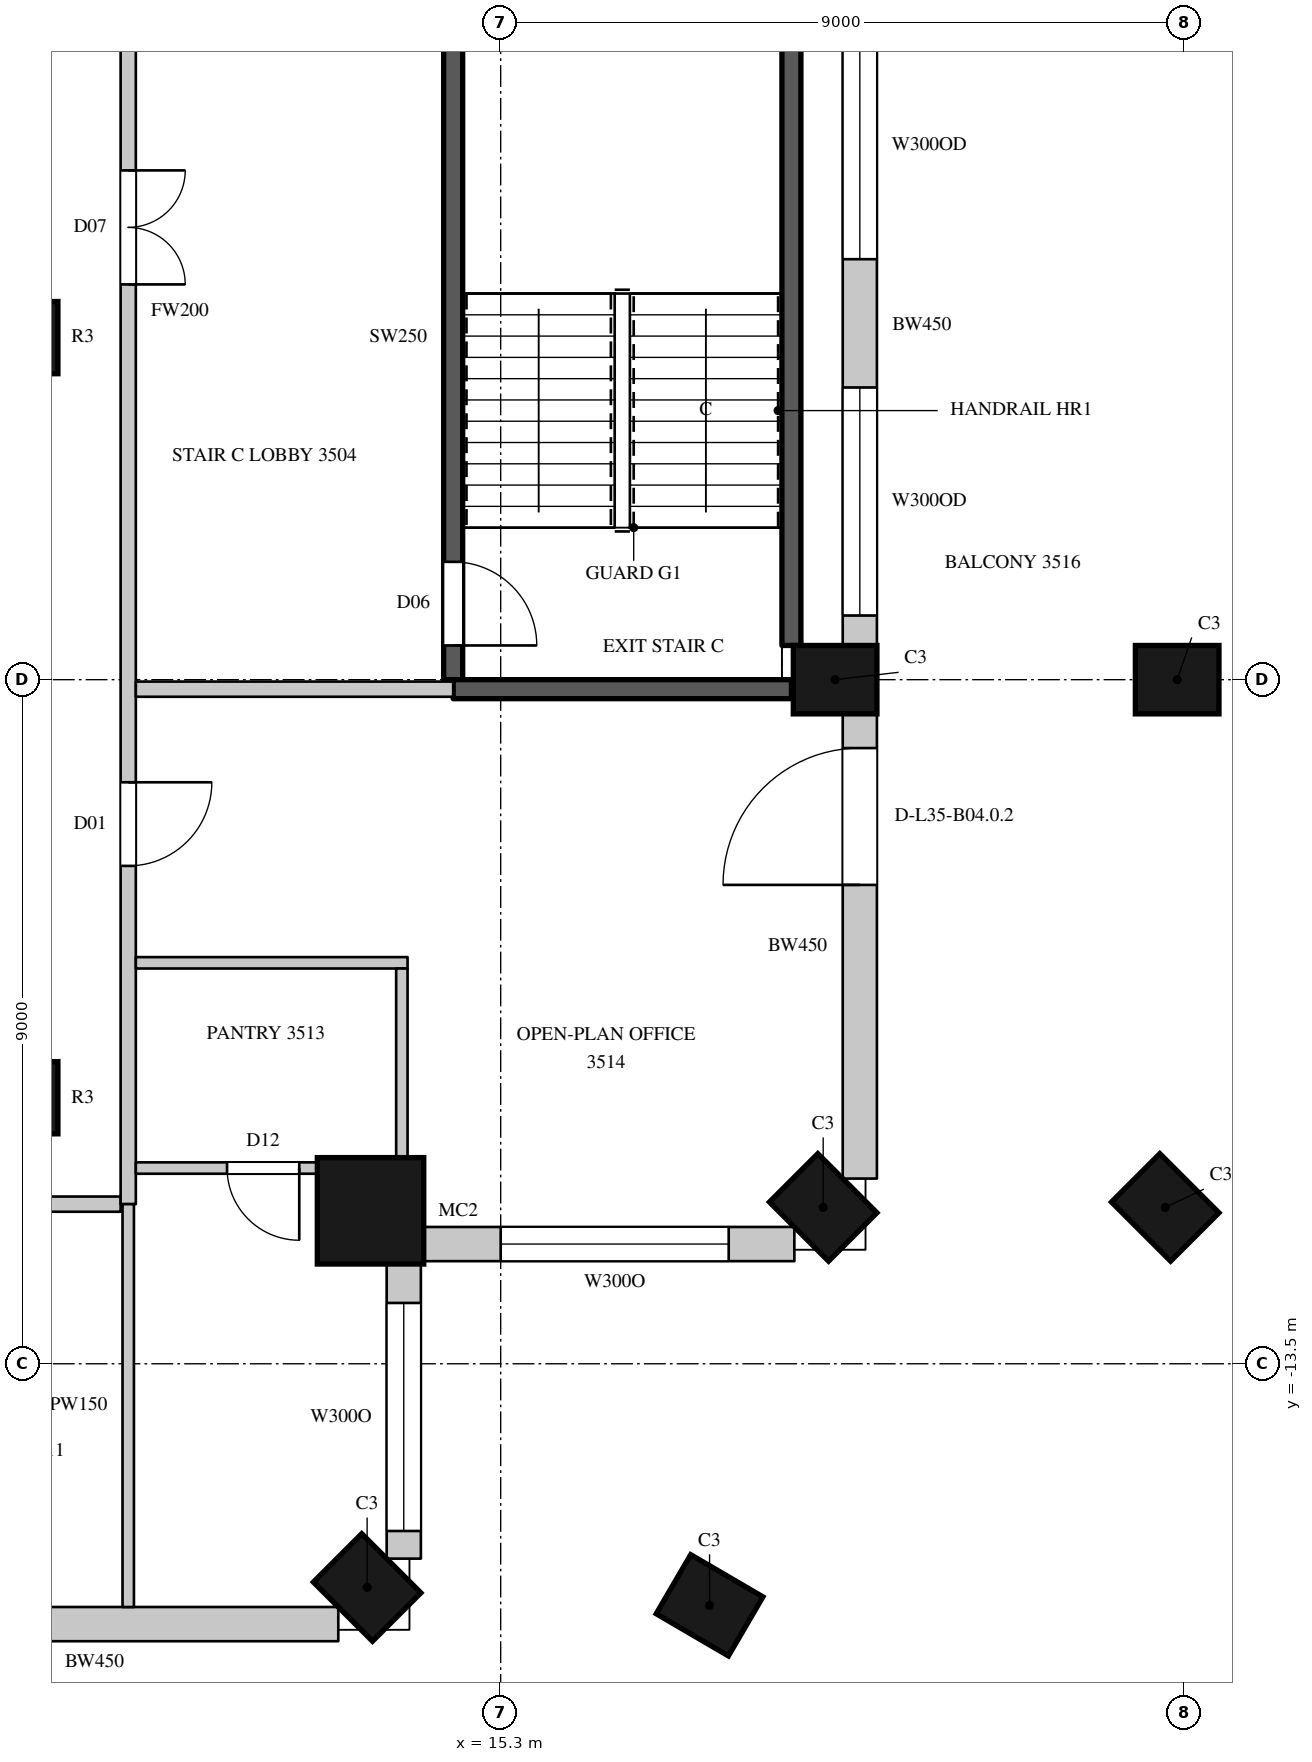
"""IFC4 building model, lengths in metres.
Left out: names, types, materials, properties, quantities, classifications, styles, units other than length and angle.
Written with IfcOpenShell. Run it as: python <this file> out.ifc"""

import sys

from ifc_helpers import new_model, si_unit, direction, frame, frame_2d, origin, origin_2d, place, context, subcontext, project, spatial, rectangle, circle, extrude, element, fill, save


model = new_model("IFC4")
c1 = context("Model", 3, precision=1e-05, world=origin(), true_north=direction((0.0, 1.0)))
c2 = subcontext(c1, "Body", "Model", "MODEL_VIEW")
j1 = project(units=[si_unit("LENGTHUNIT", "METRE"), si_unit("PLANEANGLEUNIT", "RADIAN")], contexts=[c1])
p1 = place(None, origin())
s1 = spatial("IfcSite", under=j1, at=p1, CompositionType="ELEMENT")
p2 = place(p1, origin())
s2 = spatial("IfcBuilding", under=s1, at=p2, CompositionType="ELEMENT")
p3 = place(p2, frame((0.0, 0.0, 164.6)))
s3 = spatial("IfcBuildingStorey", under=s2, at=p3, CompositionType="ELEMENT", Elevation=164.6)
p4 = place(p3, frame((13.543, -16.443, 0.0), z_axis=(0.0, 0.0, 1.0), x_axis=(0.707106781187, 0.707106781187, 0.0)))
e1 = element("IfcColumn", 1, at=p4, inside=s3, PredefinedType="COLUMN", context=c2, shape_type="SweptSolid", body=[
    extrude(rectangle(XDim=0.9, YDim=1.1, at=origin_2d()), origin(), (0.0, 0.0, 1.0), 4.1),
])
p5 = place(p3, frame((13.588, -11.488, 0.0), z_axis=(0.0, 0.0, 1.0), x_axis=(1.0, 0.0, 0.0)))
e2 = element("IfcColumn", 2, at=p5, inside=s3, PredefinedType="COLUMN", context=c2, shape_type="SweptSolid", body=[
    extrude(circle(Radius=0.7, at=origin_2d()), origin(), (0.0, 0.0, 1.0), 4.1),
])
for number, where, z_axis, x_axis in (
    (3, (19.543, -11.443, 0.0), (0.0, 0.0, 1.0), (0.707, 0.707, 0.0)),
    (4, (19.7, -4.5, 0.0), (0.0, 0.0, 1.0), (0.0, 1.0, 0.0)),
    (5, (18.048, -16.677, 0.0), (0.0, 0.0, 1.0), (0.504, 0.863, 0.0)),
    (6, (24.043, -11.443, 0.0), (0.0, 0.0, 1.0), (0.707, 0.707, 0.0)),
    (7, (24.2, -4.5, 0.0), (0.0, 0.0, 1.0), (0.0, 1.0, 0.0)),
):
    element("IfcColumn", number, at=place(p3, frame(where, z_axis=z_axis, x_axis=x_axis)), inside=s3, PredefinedType="COLUMN", context=c2, shape_type="SweptSolid", body=[
        extrude(rectangle(XDim=0.9, YDim=1.1, at=origin_2d()), origin(), (0.0, 0.0, 1.0), 4.1),
    ])
for number, where, z_axis, x_axis in (
    (8, (9.0, -10.0, 0.0), (0.0, 0.0, 1.0), (1.0, 0.0, 0.0)),
    (9, (9.0, 0.0, 0.0), (0.0, 0.0, 1.0), (1.0, 0.0, 0.0)),
):
    element("IfcColumn", number, at=place(p3, frame(where, z_axis=z_axis, x_axis=x_axis)), inside=s3, PredefinedType="COLUMN", context=c2, shape_type="SweptSolid", body=[
        extrude(circle(Radius=0.475, at=origin_2d()), origin(), (0.0, 0.0, 1.0), 4.1),
    ])
p6 = place(p3, frame((6.75, -16.925, 0.0), z_axis=(0.0, 0.0, 1.0), x_axis=(1.0, 0.0, 0.0)))
e10 = element("IfcWall", 10, at=p6, inside=s3, PredefinedType="SOLIDWALL", context=c2, shape_type="SweptSolid", body=[
    extrude(rectangle(XDim=6.414, YDim=0.45, at=frame_2d((3.207, 0.0))), origin(), (0.0, 0.0, 1.0), 3.8),
])
p7 = place(p6, frame((0.525, 0.0, 0.0)))
e11 = element("IfcOpeningElement", 11, at=p7, cuts=e10, PredefinedType="OPENING", context=c2, shape_type="SweptSolid", body=[
    extrude(rectangle(XDim=1.8, YDim=2.4, at=frame_2d((0.9, 1.2))), frame((0.0, 0.235, 0.0), z_axis=(0.0, -1.0, 0.0), x_axis=(1.0, 0.0, 0.0)), (0.0, 0.0, 1.0), 0.47),
])
p8 = place(p3, frame((14.025, -16.064, 0.0), z_axis=(0.0, 0.0, 1.0), x_axis=(0.0, 1.0, 0.0)))
e12 = element("IfcWall", 12, at=p8, inside=s3, PredefinedType="SOLIDWALL", context=c2, shape_type="SweptSolid", body=[
    extrude(rectangle(XDim=3.909, YDim=0.45, at=frame_2d((1.955, 0.0))), origin(), (0.0, 0.0, 1.0), 3.8),
])
p9 = place(p8, frame((0.364, 0.0, 1.05)))
e13 = element("IfcOpeningElement", 13, at=p9, cuts=e12, PredefinedType="OPENING", context=c2, shape_type="SweptSolid", body=[
    extrude(rectangle(XDim=3.0, YDim=2.4, at=frame_2d((1.5, 1.2))), frame((0.0, 0.235, 0.0), z_axis=(0.0, -1.0, 0.0), x_axis=(1.0, 0.0, 0.0)), (0.0, 0.0, 1.0), 0.47),
])
p10 = place(p3, frame((14.255, -11.925, 0.0), z_axis=(0.0, 0.0, 1.0), x_axis=(1.0, 0.0, 0.0)))
e14 = element("IfcWall", 14, at=p10, inside=s3, PredefinedType="SOLIDWALL", context=c2, shape_type="SweptSolid", body=[
    extrude(rectangle(XDim=4.909, YDim=0.45, at=frame_2d((2.455, 0.0))), origin(), (0.0, 0.0, 1.0), 3.8),
])
p11 = place(p10, frame((1.045, 0.0, 1.05)))
e15 = element("IfcOpeningElement", 15, at=p11, cuts=e14, PredefinedType="OPENING", context=c2, shape_type="SweptSolid", body=[
    extrude(rectangle(XDim=3.0, YDim=2.4, at=frame_2d((1.5, 1.2))), frame((0.0, 0.235, 0.0), z_axis=(0.0, -1.0, 0.0), x_axis=(1.0, 0.0, 0.0)), (0.0, 0.0, 1.0), 0.47),
])
p12 = place(p3, frame((20.025, -11.064, 0.0), z_axis=(0.0, 0.0, 1.0), x_axis=(0.0, 1.0, 0.0)))
e16 = element("IfcWall", 16, at=p12, inside=s3, PredefinedType="SOLIDWALL", context=c2, shape_type="SweptSolid", body=[
    extrude(rectangle(XDim=6.114, YDim=0.45, at=frame_2d((3.057, 0.0))), origin(), (0.0, 0.0, 1.0), 3.8),
])
p13 = place(p12, frame((3.864, 0.0, 0.0)))
e17 = element("IfcOpeningElement", 17, at=p13, cuts=e16, PredefinedType="OPENING", context=c2, shape_type="SweptSolid", body=[
    extrude(rectangle(XDim=1.8, YDim=2.4, at=frame_2d((0.9, 1.2))), frame((0.0, 0.235, 0.0), z_axis=(0.0, -1.0, 0.0), x_axis=(1.0, 0.0, 0.0)), (0.0, 0.0, 1.0), 0.47),
])
p14 = place(p3, frame((20.025, -4.05, 0.0), z_axis=(0.0, 0.0, 1.0), x_axis=(0.0, 1.0, 0.0)))
e18 = element("IfcWall", 18, at=p14, inside=s3, PredefinedType="SOLIDWALL", context=c2, shape_type="SweptSolid", body=[
    extrude(rectangle(XDim=8.439, YDim=0.45, at=frame_2d((4.219, 0.0))), origin(), (0.0, 0.0, 1.0), 3.8),
])
p15 = place(p14, frame((0.394, 0.0, 1.05)))
e19 = element("IfcOpeningElement", 19, at=p15, cuts=e18, PredefinedType="OPENING", context=c2, shape_type="SweptSolid", body=[
    extrude(rectangle(XDim=3.0, YDim=2.4, at=frame_2d((1.5, 1.2))), frame((0.0, 0.235, 0.0), z_axis=(0.0, -1.0, 0.0), x_axis=(1.0, 0.0, 0.0)), (0.0, 0.0, 1.0), 0.47),
])
p16 = place(p14, frame((5.082, 0.0, 1.05)))
e20 = element("IfcOpeningElement", 20, at=p16, cuts=e18, PredefinedType="OPENING", context=c2, shape_type="SweptSolid", body=[
    extrude(rectangle(XDim=3.0, YDim=2.4, at=frame_2d((1.5, 1.2))), frame((0.0, 0.235, 0.0), z_axis=(0.0, -1.0, 0.0), x_axis=(1.0, 0.0, 0.0)), (0.0, 0.0, 1.0), 0.47),
])
p17 = place(p3, frame((21.1, -5.1, 0.0), z_axis=(0.0, 0.0, 1.0), x_axis=(0.0, 1.0, 0.0)))
e21 = element("IfcWall", 21, at=p17, inside=s3, PredefinedType="SOLIDWALL", context=c2, shape_type="SweptSolid", body=[
    extrude(rectangle(XDim=3.583, YDim=0.45, at=frame_2d((1.792, 0.0))), origin(), (0.0, 0.0, 1.0), 0.6),
])
p18 = place(p3, frame((21.1, -0.617, 0.0), z_axis=(0.0, 0.0, 1.0), x_axis=(0.0, 1.0, 0.0)))
e22 = element("IfcWall", 22, at=p18, inside=s3, PredefinedType="SOLIDWALL", context=c2, shape_type="SweptSolid", body=[
    extrude(rectangle(XDim=2.567, YDim=0.45, at=frame_2d((1.283, 0.0))), origin(), (0.0, 0.0, 1.0), 0.6),
])
p19 = place(p3, frame((-10.9, -11.4, 0.0), z_axis=(0.0, 0.0, 1.0), x_axis=(1.0, 0.0, 0.0)))
e23 = element("IfcWall", 23, at=p19, inside=s3, PredefinedType="PARTITIONING", context=c2, shape_type="SweptSolid", body=[
    extrude(rectangle(XDim=21.2, YDim=0.2, at=frame_2d((10.6, 0.0))), origin(), (0.0, 0.0, 1.0), 3.8),
])
p20 = place(p19, frame((0.95, 0.0, 0.0)))
e24 = element("IfcOpeningElement", 24, at=p20, cuts=e23, PredefinedType="OPENING", context=c2, shape_type="SweptSolid", body=[
    extrude(rectangle(XDim=0.95, YDim=2.2, at=frame_2d((0.475, 1.1))), frame((0.0, 0.11, 0.0), z_axis=(0.0, -1.0, 0.0), x_axis=(1.0, 0.0, 0.0)), (0.0, 0.0, 1.0), 0.22),
])
p21 = place(p19, frame((4.2, 0.0, 0.0)))
e25 = element("IfcOpeningElement", 25, at=p21, cuts=e23, PredefinedType="OPENING", context=c2, shape_type="SweptSolid", body=[
    extrude(rectangle(XDim=0.95, YDim=2.2, at=frame_2d((0.475, 1.1))), frame((0.0, 0.11, 0.0), z_axis=(0.0, -1.0, 0.0), x_axis=(1.0, 0.0, 0.0)), (0.0, 0.0, 1.0), 0.22),
])
p22 = place(p19, frame((7.1, 0.0, 0.0)))
e26 = element("IfcOpeningElement", 26, at=p22, cuts=e23, PredefinedType="OPENING", context=c2, shape_type="SweptSolid", body=[
    extrude(rectangle(XDim=0.9, YDim=2.2, at=frame_2d((0.45, 1.1))), frame((0.0, 0.11, 0.0), z_axis=(0.0, -1.0, 0.0), x_axis=(1.0, 0.0, 0.0)), (0.0, 0.0, 1.0), 0.22),
])
p23 = place(p19, frame((10.0, 0.0, 0.0)))
e27 = element("IfcOpeningElement", 27, at=p23, cuts=e23, PredefinedType="OPENING", context=c2, shape_type="SweptSolid", body=[
    extrude(rectangle(XDim=0.9, YDim=2.2, at=frame_2d((0.45, 1.1))), frame((0.0, 0.11, 0.0), z_axis=(0.0, -1.0, 0.0), x_axis=(1.0, 0.0, 0.0)), (0.0, 0.0, 1.0), 0.22),
])
p24 = place(p19, frame((13.55, 0.0, 0.0)))
e28 = element("IfcOpeningElement", 28, at=p24, cuts=e23, PredefinedType="OPENING", context=c2, shape_type="SweptSolid", body=[
    extrude(rectangle(XDim=0.9, YDim=2.2, at=frame_2d((0.45, 1.1))), frame((0.0, 0.11, 0.0), z_axis=(0.0, -1.0, 0.0), x_axis=(1.0, 0.0, 0.0)), (0.0, 0.0, 1.0), 0.22),
])
p25 = place(p19, frame((17.85, 0.0, 0.0)))
e29 = element("IfcOpeningElement", 29, at=p25, cuts=e23, PredefinedType="OPENING", context=c2, shape_type="SweptSolid", body=[
    extrude(rectangle(XDim=1.1, YDim=2.4, at=frame_2d((0.55, 1.2))), frame((0.0, 0.11, 0.0), z_axis=(0.0, -1.0, 0.0), x_axis=(1.0, 0.0, 0.0)), (0.0, 0.0, 1.0), 0.22),
])
p26 = place(p3, frame((10.4, -11.4, 0.0), z_axis=(0.0, 0.0, 1.0), x_axis=(0.0, 1.0, 0.0)))
e30 = element("IfcWall", 30, at=p26, inside=s3, PredefinedType="PARTITIONING", context=c2, shape_type="SweptSolid", body=[
    extrude(rectangle(XDim=23.5, YDim=0.2, at=frame_2d((11.75, 0.0))), origin(), (0.0, 0.0, 1.0), 3.8),
])
p27 = place(p26, frame((12.1, 0.0, 0.0)))
e31 = element("IfcOpeningElement", 31, at=p27, cuts=e30, PredefinedType="OPENING", context=c2, shape_type="SweptSolid", body=[
    extrude(rectangle(XDim=1.5, YDim=2.4, at=frame_2d((0.75, 1.2))), frame((0.0, 0.11, 0.0), z_axis=(0.0, -1.0, 0.0), x_axis=(1.0, 0.0, 0.0)), (0.0, 0.0, 1.0), 0.22),
])
p28 = place(p26, frame((19.25, 0.0, 0.0)))
e32 = element("IfcOpeningElement", 32, at=p28, cuts=e30, PredefinedType="OPENING", context=c2, shape_type="SweptSolid", body=[
    extrude(rectangle(XDim=1.1, YDim=2.4, at=frame_2d((0.55, 1.2))), frame((0.0, 0.11, 0.0), z_axis=(0.0, -1.0, 0.0), x_axis=(1.0, 0.0, 0.0)), (0.0, 0.0, 1.0), 0.22),
])
p29 = place(p26, frame((4.45, 0.0, 0.0)))
e33 = element("IfcOpeningElement", 33, at=p29, cuts=e30, PredefinedType="OPENING", context=c2, shape_type="SweptSolid", body=[
    extrude(rectangle(XDim=1.1, YDim=2.4, at=frame_2d((0.55, 1.2))), frame((0.0, 0.11, 0.0), z_axis=(0.0, -1.0, 0.0), x_axis=(1.0, 0.0, 0.0)), (0.0, 0.0, 1.0), 0.22),
])
p30 = place(p3, frame((10.5, -4.625, 0.0), z_axis=(0.0, 0.0, 1.0), x_axis=(1.0, 0.0, 0.0)))
e34 = element("IfcWall", 34, at=p30, inside=s3, PredefinedType="PARTITIONING", context=c2, shape_type="SweptSolid", body=[
    extrude(rectangle(XDim=4.175, YDim=0.2, at=frame_2d((2.087, 0.0))), origin(), (0.0, 0.0, 1.0), 3.8),
])
p31 = place(p3, frame((10.4, -16.7, 0.0), z_axis=(0.0, 0.0, 1.0), x_axis=(0.0, 1.0, 0.0)))
e35 = element("IfcWall", 35, at=p31, inside=s3, PredefinedType="PARTITIONING", context=c2, shape_type="SweptSolid", body=[
    extrude(rectangle(XDim=5.3, YDim=0.15, at=frame_2d((2.65, 0.0))), origin(), (0.0, 0.0, 1.0), 3.8),
])
p32 = place(p3, frame((10.5, -10.925, 0.0), z_axis=(0.0, 0.0, 1.0), x_axis=(1.0, 0.0, 0.0)))
e36 = element("IfcWall", 36, at=p32, inside=s3, PredefinedType="PARTITIONING", context=c2, shape_type="SweptSolid", body=[
    extrude(rectangle(XDim=2.606, YDim=0.15, at=frame_2d((1.303, 0.0))), origin(), (0.0, 0.0, 1.0), 3.8),
])
p33 = place(p32, frame((1.2, 0.0, 0.0)))
e37 = element("IfcOpeningElement", 37, at=p33, cuts=e36, PredefinedType="OPENING", context=c2, shape_type="SweptSolid", body=[
    extrude(rectangle(XDim=0.95, YDim=2.2, at=frame_2d((0.475, 1.1))), frame((0.0, 0.085, 0.0), z_axis=(0.0, -1.0, 0.0), x_axis=(1.0, 0.0, 0.0)), (0.0, 0.0, 1.0), 0.17),
])
p34 = place(p3, frame((10.5, -8.225, 0.0), z_axis=(0.0, 0.0, 1.0), x_axis=(1.0, 0.0, 0.0)))
e38 = element("IfcWall", 38, at=p34, inside=s3, PredefinedType="PARTITIONING", context=c2, shape_type="SweptSolid", body=[
    extrude(rectangle(XDim=3.575, YDim=0.15, at=frame_2d((1.788, 0.0))), origin(), (0.0, 0.0, 1.0), 3.15),
])
p35 = place(p3, frame((14.0, -10.85, 0.0), z_axis=(0.0, 0.0, 1.0), x_axis=(0.0, 1.0, 0.0)))
e39 = element("IfcWall", 39, at=p35, inside=s3, PredefinedType="PARTITIONING", context=c2, shape_type="SweptSolid", body=[
    extrude(rectangle(XDim=2.55, YDim=0.15, at=frame_2d((1.275, 0.0))), origin(), (0.0, 0.0, 1.0), 3.8),
])
p36 = place(p3, frame((14.675, -4.5, 0.0), z_axis=(0.0, 0.0, 1.0), x_axis=(0.0, 1.0, 0.0)))
e40 = element("IfcWall", 40, at=p36, inside=s3, PredefinedType="SHEAR", context=c2, shape_type="SweptSolid", body=[
    extrude(rectangle(XDim=9.0, YDim=0.25, at=frame_2d((4.5, 0.0))), origin(), (0.0, 0.0, 1.0), 3.8),
])
p37 = place(p36, frame((0.45, 0.0, 0.0)))
e41 = element("IfcOpeningElement", 41, at=p37, cuts=e40, PredefinedType="OPENING", context=c2, shape_type="SweptSolid", body=[
    extrude(rectangle(XDim=1.1, YDim=2.2, at=frame_2d((0.55, 1.1))), frame((0.0, 0.135, 0.0), z_axis=(0.0, -1.0, 0.0), x_axis=(1.0, 0.0, 0.0)), (0.0, 0.0, 1.0), 0.27),
])
p38 = place(p3, frame((14.675, -4.625, 0.0), z_axis=(0.0, 0.0, 1.0), x_axis=(1.0, 0.0, 0.0)))
e42 = element("IfcWall", 42, at=p38, inside=s3, PredefinedType="SHEAR", context=c2, shape_type="SweptSolid", body=[
    extrude(rectangle(XDim=4.45, YDim=0.25, at=frame_2d((2.225, 0.0))), origin(), (0.0, 0.0, 1.0), 3.8),
])
p39 = place(p3, frame((19.125, -4.05, 0.0), z_axis=(0.0, 0.0, 1.0), x_axis=(0.0, 1.0, 0.0)))
e43 = element("IfcWall", 43, at=p39, inside=s3, PredefinedType="SHEAR", context=c2, shape_type="SweptSolid", body=[
    extrude(rectangle(XDim=8.477, YDim=0.25, at=frame_2d((4.238, 0.0))), origin(), (0.0, 0.0, 1.0), 3.8),
])
p40 = place(p9, origin())
e44 = element("IfcWindow", 44, at=p40, inside=s3, PartitioningType="SINGLE_PANEL", PredefinedType="WINDOW", context=c2, shape_type="SweptSolid", body=[
    extrude(rectangle(XDim=3.0, YDim=2.4, at=frame_2d((1.5, 1.2))), frame((0.0, 0.135, 0.0), z_axis=(0.0, -1.0, 0.0), x_axis=(1.0, 0.0, 0.0)), (0.0, 0.0, 1.0), 0.06),
])
fill(e13, e44)
p41 = place(p11, origin())
e45 = element("IfcWindow", 45, at=p41, inside=s3, PartitioningType="SINGLE_PANEL", PredefinedType="WINDOW", context=c2, shape_type="SweptSolid", body=[
    extrude(rectangle(XDim=3.0, YDim=2.4, at=frame_2d((1.5, 1.2))), frame((0.0, 0.135, 0.0), z_axis=(0.0, -1.0, 0.0), x_axis=(1.0, 0.0, 0.0)), (0.0, 0.0, 1.0), 0.06),
])
fill(e15, e45)
p42 = place(p13, origin())
e46 = element("IfcDoor", 46, at=p42, inside=s3, OperationType="SLIDING_TO_LEFT", PredefinedType="DOOR", context=c2, shape_type="SweptSolid", body=[
    extrude(rectangle(XDim=1.8, YDim=2.4, at=frame_2d((0.9, 1.2))), frame((0.0, 0.13, 0.0), z_axis=(0.0, -1.0, 0.0), x_axis=(1.0, 0.0, 0.0)), (0.0, 0.0, 1.0), 0.05),
])
fill(e17, e46)
p43 = place(p15, origin())
e47 = element("IfcWindow", 47, at=p43, inside=s3, PartitioningType="SINGLE_PANEL", PredefinedType="WINDOW", context=c2, shape_type="SweptSolid", body=[
    extrude(rectangle(XDim=3.0, YDim=2.4, at=frame_2d((1.5, 1.2))), frame((0.0, 0.135, 0.0), z_axis=(0.0, -1.0, 0.0), x_axis=(1.0, 0.0, 0.0)), (0.0, 0.0, 1.0), 0.06),
])
fill(e19, e47)
p44 = place(p16, origin())
e48 = element("IfcWindow", 48, at=p44, inside=s3, PartitioningType="SINGLE_PANEL", PredefinedType="WINDOW", context=c2, shape_type="SweptSolid", body=[
    extrude(rectangle(XDim=3.0, YDim=2.4, at=frame_2d((1.5, 1.2))), frame((0.0, 0.135, 0.0), z_axis=(0.0, -1.0, 0.0), x_axis=(1.0, 0.0, 0.0)), (0.0, 0.0, 1.0), 0.06),
])
fill(e20, e48)
p45 = place(p27, origin())
e49 = element("IfcDoor", 49, at=p45, inside=s3, OperationType="DOUBLE_DOOR_SINGLE_SWING", PredefinedType="DOOR", context=c2, shape_type="SweptSolid", body=[
    extrude(rectangle(XDim=1.5, YDim=2.4, at=frame_2d((0.75, 1.2))), frame((0.0, 0.025, 0.0), z_axis=(0.0, -1.0, 0.0), x_axis=(1.0, 0.0, 0.0)), (0.0, 0.0, 1.0), 0.05),
])
fill(e31, e49)
p46 = place(p29, origin())
e50 = element("IfcDoor", 50, at=p46, inside=s3, OperationType="SINGLE_SWING_LEFT", PredefinedType="DOOR", context=c2, shape_type="SweptSolid", body=[
    extrude(rectangle(XDim=1.1, YDim=2.4, at=frame_2d((0.55, 1.2))), frame((0.0, 0.025, 0.0), z_axis=(0.0, -1.0, 0.0), x_axis=(1.0, 0.0, 0.0)), (0.0, 0.0, 1.0), 0.05),
])
fill(e33, e50)
p47 = place(p33, origin())
e51 = element("IfcDoor", 51, at=p47, inside=s3, OperationType="SINGLE_SWING_LEFT", PredefinedType="DOOR", context=c2, shape_type="SweptSolid", body=[
    extrude(rectangle(XDim=0.95, YDim=2.2, at=frame_2d((0.475, 1.1))), frame((0.0, 0.025, 0.0), z_axis=(0.0, -1.0, 0.0), x_axis=(1.0, 0.0, 0.0)), (0.0, 0.0, 1.0), 0.05),
])
fill(e37, e51)
p48 = place(p37, origin())
e52 = element("IfcDoor", 52, at=p48, inside=s3, OperationType="SINGLE_SWING_RIGHT", PredefinedType="DOOR", context=c2, shape_type="SweptSolid", body=[
    extrude(rectangle(XDim=1.1, YDim=2.2, at=frame_2d((0.55, 1.1))), frame((0.0, 0.025, 0.0), z_axis=(0.0, -1.0, 0.0), x_axis=(1.0, 0.0, 0.0)), (0.0, 0.0, 1.0), 0.05),
])
fill(e41, e52)
save(model, sys.argv[1])
